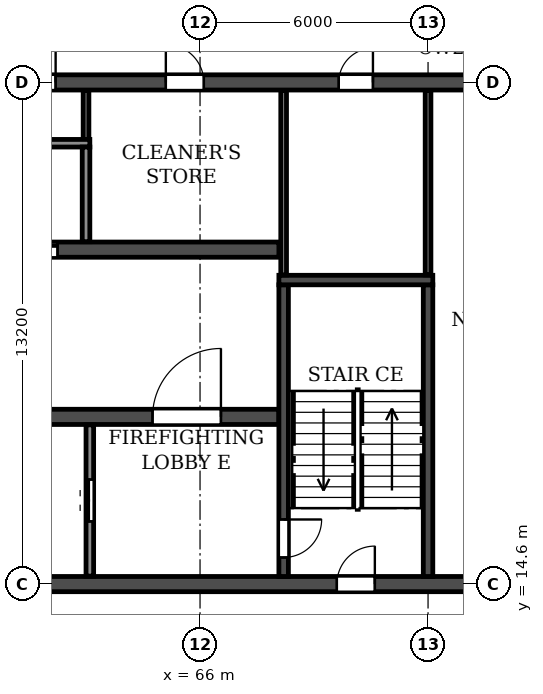
"""IFC4 building model, lengths in metres.
Left out: names, types, materials, properties, quantities, classifications, styles, units other than length and angle.
Written with IfcOpenShell. Run it as: python <this file> out.ifc"""

import sys

from ifc_helpers import new_model, si_unit, direction, frame, frame_2d, origin, place, context, subcontext, project, spatial, rectangle, extrude, element, fill, save


model = new_model("IFC4")
c1 = context("Model", 3, precision=1e-05, world=origin(), true_north=direction((0.0, 1.0)))
c2 = subcontext(c1, "Body", "Model", "MODEL_VIEW")
j1 = project(units=[si_unit("LENGTHUNIT", "METRE"), si_unit("PLANEANGLEUNIT", "RADIAN")], contexts=[c1])
p1 = place(None, origin())
s1 = spatial("IfcSite", under=j1, at=p1, CompositionType="ELEMENT")
p2 = place(p1, origin())
s2 = spatial("IfcBuilding", under=s1, at=p2, CompositionType="ELEMENT")
p3 = place(p2, frame((0.0, 0.0, 201.6)))
s3 = spatial("IfcBuildingStorey", under=s2, at=p3, CompositionType="ELEMENT", Elevation=201.6)
p4 = place(p3, frame((18.2, 14.6, 0.0), z_axis=(0.0, 0.0, 1.0), x_axis=(1.0, 0.0, 0.0)))
e1 = element("IfcWall", 1, at=p4, inside=s3, PredefinedType="SOLIDWALL", context=c2, shape_type="SweptSolid", body=[
    extrude(rectangle(XDim=65.6, YDim=0.4, at=frame_2d((32.8, 0.0))), origin(), (0.0, 0.0, 1.0), 3.08),
])
p5 = place(p4, frame((0.7, 0.0, 0.0)))
e2 = element("IfcOpeningElement", 2, at=p5, cuts=e1, PredefinedType="OPENING", context=c2, shape_type="SweptSolid", body=[
    extrude(rectangle(XDim=1.0, YDim=2.1, at=frame_2d((0.5, 1.05))), frame((0.0, 0.21, 0.0), z_axis=(0.0, -1.0, 0.0), x_axis=(1.0, 0.0, 0.0)), (0.0, 0.0, 1.0), 0.42),
])
p6 = place(p4, frame((8.6, 0.0, 0.0)))
e3 = element("IfcOpeningElement", 3, at=p6, cuts=e1, PredefinedType="OPENING", context=c2, shape_type="SweptSolid", body=[
    extrude(rectangle(XDim=1.0, YDim=2.1, at=frame_2d((0.5, 1.05))), frame((0.0, 0.21, 0.0), z_axis=(0.0, -1.0, 0.0), x_axis=(1.0, 0.0, 0.0)), (0.0, 0.0, 1.0), 0.42),
])
p7 = place(p4, frame((13.2, 0.0, 0.0)))
e4 = element("IfcOpeningElement", 4, at=p7, cuts=e1, PredefinedType="OPENING", context=c2, shape_type="SweptSolid", body=[
    extrude(rectangle(XDim=1.0, YDim=2.1, at=frame_2d((0.5, 1.05))), frame((0.0, 0.21, 0.0), z_axis=(0.0, -1.0, 0.0), x_axis=(1.0, 0.0, 0.0)), (0.0, 0.0, 1.0), 0.42),
])
p8 = place(p4, frame((27.1, 0.0, 0.0)))
e5 = element("IfcOpeningElement", 5, at=p8, cuts=e1, PredefinedType="OPENING", context=c2, shape_type="SweptSolid", body=[
    extrude(rectangle(XDim=1.0, YDim=2.1, at=frame_2d((0.5, 1.05))), frame((0.0, 0.21, 0.0), z_axis=(0.0, -1.0, 0.0), x_axis=(1.0, 0.0, 0.0)), (0.0, 0.0, 1.0), 0.42),
])
p9 = place(p4, frame((32.3, 0.0, 0.0)))
e6 = element("IfcOpeningElement", 6, at=p9, cuts=e1, PredefinedType="OPENING", context=c2, shape_type="SweptSolid", body=[
    extrude(rectangle(XDim=1.0, YDim=2.1, at=frame_2d((0.5, 1.05))), frame((0.0, 0.21, 0.0), z_axis=(0.0, -1.0, 0.0), x_axis=(1.0, 0.0, 0.0)), (0.0, 0.0, 1.0), 0.42),
])
p10 = place(p4, frame((34.9, 0.0, 0.0)))
e7 = element("IfcOpeningElement", 7, at=p10, cuts=e1, PredefinedType="OPENING", context=c2, shape_type="SweptSolid", body=[
    extrude(rectangle(XDim=1.0, YDim=2.1, at=frame_2d((0.5, 1.05))), frame((0.0, 0.21, 0.0), z_axis=(0.0, -1.0, 0.0), x_axis=(1.0, 0.0, 0.0)), (0.0, 0.0, 1.0), 0.42),
])
p11 = place(p4, frame((38.8, 0.0, 0.0)))
e8 = element("IfcOpeningElement", 8, at=p11, cuts=e1, PredefinedType="OPENING", context=c2, shape_type="SweptSolid", body=[
    extrude(rectangle(XDim=1.0, YDim=2.1, at=frame_2d((0.5, 1.05))), frame((0.0, 0.21, 0.0), z_axis=(0.0, -1.0, 0.0), x_axis=(1.0, 0.0, 0.0)), (0.0, 0.0, 1.0), 0.42),
])
p12 = place(p4, frame((51.4, 0.0, 0.0)))
e9 = element("IfcOpeningElement", 9, at=p12, cuts=e1, PredefinedType="OPENING", context=c2, shape_type="SweptSolid", body=[
    extrude(rectangle(XDim=1.0, YDim=2.1, at=frame_2d((0.5, 1.05))), frame((0.0, 0.21, 0.0), z_axis=(0.0, -1.0, 0.0), x_axis=(1.0, 0.0, 0.0)), (0.0, 0.0, 1.0), 0.42),
])
p13 = place(p4, frame((56.0, 0.0, 0.0)))
e10 = element("IfcOpeningElement", 10, at=p13, cuts=e1, PredefinedType="OPENING", context=c2, shape_type="SweptSolid", body=[
    extrude(rectangle(XDim=1.0, YDim=2.1, at=frame_2d((0.5, 1.05))), frame((0.0, 0.21, 0.0), z_axis=(0.0, -1.0, 0.0), x_axis=(1.0, 0.0, 0.0)), (0.0, 0.0, 1.0), 0.42),
])
p14 = place(p4, frame((63.9, 0.0, 0.0)))
e11 = element("IfcOpeningElement", 11, at=p14, cuts=e1, PredefinedType="OPENING", context=c2, shape_type="SweptSolid", body=[
    extrude(rectangle(XDim=1.0, YDim=2.1, at=frame_2d((0.5, 1.05))), frame((0.0, 0.21, 0.0), z_axis=(0.0, -1.0, 0.0), x_axis=(1.0, 0.0, 0.0)), (0.0, 0.0, 1.0), 0.42),
])
p15 = place(p3, frame((18.2, 27.8, 0.0), z_axis=(0.0, 0.0, 1.0), x_axis=(1.0, 0.0, 0.0)))
e12 = element("IfcWall", 12, at=p15, inside=s3, PredefinedType="SOLIDWALL", context=c2, shape_type="SweptSolid", body=[
    extrude(rectangle(XDim=65.6, YDim=0.4, at=frame_2d((32.8, 0.0))), origin(), (0.0, 0.0, 1.0), 3.08),
])
p16 = place(p15, frame((0.7, 0.0, 0.0)))
e13 = element("IfcOpeningElement", 13, at=p16, cuts=e12, PredefinedType="OPENING", context=c2, shape_type="SweptSolid", body=[
    extrude(rectangle(XDim=1.0, YDim=2.1, at=frame_2d((0.5, 1.05))), frame((0.0, 0.21, 0.0), z_axis=(0.0, -1.0, 0.0), x_axis=(1.0, 0.0, 0.0)), (0.0, 0.0, 1.0), 0.42),
])
p17 = place(p15, frame((4.05, 0.0, 0.0)))
e14 = element("IfcOpeningElement", 14, at=p17, cuts=e12, PredefinedType="OPENING", context=c2, shape_type="SweptSolid", body=[
    extrude(rectangle(XDim=0.9, YDim=2.1, at=frame_2d((0.45, 1.05))), frame((0.0, 0.21, 0.0), z_axis=(0.0, -1.0, 0.0), x_axis=(1.0, 0.0, 0.0)), (0.0, 0.0, 1.0), 0.42),
])
p18 = place(p15, frame((13.25, 0.0, 0.0)))
e15 = element("IfcOpeningElement", 15, at=p18, cuts=e12, PredefinedType="OPENING", context=c2, shape_type="SweptSolid", body=[
    extrude(rectangle(XDim=0.9, YDim=2.1, at=frame_2d((0.45, 1.05))), frame((0.0, 0.21, 0.0), z_axis=(0.0, -1.0, 0.0), x_axis=(1.0, 0.0, 0.0)), (0.0, 0.0, 1.0), 0.42),
])
p19 = place(p15, frame((17.7, 0.0, 0.0)))
e16 = element("IfcOpeningElement", 16, at=p19, cuts=e12, PredefinedType="OPENING", context=c2, shape_type="SweptSolid", body=[
    extrude(rectangle(XDim=1.0, YDim=2.1, at=frame_2d((0.5, 1.05))), frame((0.0, 0.21, 0.0), z_axis=(0.0, -1.0, 0.0), x_axis=(1.0, 0.0, 0.0)), (0.0, 0.0, 1.0), 0.42),
])
p20 = place(p15, frame((22.9, 0.0, 0.0)))
e17 = element("IfcOpeningElement", 17, at=p20, cuts=e12, PredefinedType="OPENING", context=c2, shape_type="SweptSolid", body=[
    extrude(rectangle(XDim=1.0, YDim=2.1, at=frame_2d((0.5, 1.05))), frame((0.0, 0.21, 0.0), z_axis=(0.0, -1.0, 0.0), x_axis=(1.0, 0.0, 0.0)), (0.0, 0.0, 1.0), 0.42),
])
p21 = place(p15, frame((29.4, 0.0, 0.0)))
e18 = element("IfcOpeningElement", 18, at=p21, cuts=e12, PredefinedType="OPENING", context=c2, shape_type="SweptSolid", body=[
    extrude(rectangle(XDim=1.0, YDim=2.1, at=frame_2d((0.5, 1.05))), frame((0.0, 0.21, 0.0), z_axis=(0.0, -1.0, 0.0), x_axis=(1.0, 0.0, 0.0)), (0.0, 0.0, 1.0), 0.42),
])
p22 = place(p15, frame((32.3, 0.0, 0.0)))
e19 = element("IfcOpeningElement", 19, at=p22, cuts=e12, PredefinedType="OPENING", context=c2, shape_type="SweptSolid", body=[
    extrude(rectangle(XDim=1.0, YDim=2.1, at=frame_2d((0.5, 1.05))), frame((0.0, 0.21, 0.0), z_axis=(0.0, -1.0, 0.0), x_axis=(1.0, 0.0, 0.0)), (0.0, 0.0, 1.0), 0.42),
])
p23 = place(p15, frame((35.2, 0.0, 0.0)))
e20 = element("IfcOpeningElement", 20, at=p23, cuts=e12, PredefinedType="OPENING", context=c2, shape_type="SweptSolid", body=[
    extrude(rectangle(XDim=1.0, YDim=2.1, at=frame_2d((0.5, 1.05))), frame((0.0, 0.21, 0.0), z_axis=(0.0, -1.0, 0.0), x_axis=(1.0, 0.0, 0.0)), (0.0, 0.0, 1.0), 0.42),
])
p24 = place(p15, frame((37.8, 0.0, 0.0)))
e21 = element("IfcOpeningElement", 21, at=p24, cuts=e12, PredefinedType="OPENING", context=c2, shape_type="SweptSolid", body=[
    extrude(rectangle(XDim=1.0, YDim=2.1, at=frame_2d((0.5, 1.05))), frame((0.0, 0.21, 0.0), z_axis=(0.0, -1.0, 0.0), x_axis=(1.0, 0.0, 0.0)), (0.0, 0.0, 1.0), 0.42),
])
p25 = place(p15, frame((40.4, 0.0, 0.0)))
e22 = element("IfcOpeningElement", 22, at=p25, cuts=e12, PredefinedType="OPENING", context=c2, shape_type="SweptSolid", body=[
    extrude(rectangle(XDim=1.0, YDim=2.1, at=frame_2d((0.5, 1.05))), frame((0.0, 0.21, 0.0), z_axis=(0.0, -1.0, 0.0), x_axis=(1.0, 0.0, 0.0)), (0.0, 0.0, 1.0), 0.42),
])
p26 = place(p15, frame((43.0, 0.0, 0.0)))
e23 = element("IfcOpeningElement", 23, at=p26, cuts=e12, PredefinedType="OPENING", context=c2, shape_type="SweptSolid", body=[
    extrude(rectangle(XDim=1.0, YDim=2.1, at=frame_2d((0.5, 1.05))), frame((0.0, 0.21, 0.0), z_axis=(0.0, -1.0, 0.0), x_axis=(1.0, 0.0, 0.0)), (0.0, 0.0, 1.0), 0.42),
])
p27 = place(p15, frame((46.9, 0.0, 0.0)))
e24 = element("IfcOpeningElement", 24, at=p27, cuts=e12, PredefinedType="OPENING", context=c2, shape_type="SweptSolid", body=[
    extrude(rectangle(XDim=1.0, YDim=2.1, at=frame_2d((0.5, 1.05))), frame((0.0, 0.21, 0.0), z_axis=(0.0, -1.0, 0.0), x_axis=(1.0, 0.0, 0.0)), (0.0, 0.0, 1.0), 0.42),
])
p28 = place(p15, frame((51.45, 0.0, 0.0)))
e25 = element("IfcOpeningElement", 25, at=p28, cuts=e12, PredefinedType="OPENING", context=c2, shape_type="SweptSolid", body=[
    extrude(rectangle(XDim=0.9, YDim=2.1, at=frame_2d((0.45, 1.05))), frame((0.0, 0.21, 0.0), z_axis=(0.0, -1.0, 0.0), x_axis=(1.0, 0.0, 0.0)), (0.0, 0.0, 1.0), 0.42),
])
p29 = place(p15, frame((60.65, 0.0, 0.0)))
e26 = element("IfcOpeningElement", 26, at=p29, cuts=e12, PredefinedType="OPENING", context=c2, shape_type="SweptSolid", body=[
    extrude(rectangle(XDim=0.9, YDim=2.1, at=frame_2d((0.45, 1.05))), frame((0.0, 0.21, 0.0), z_axis=(0.0, -1.0, 0.0), x_axis=(1.0, 0.0, 0.0)), (0.0, 0.0, 1.0), 0.42),
])
p30 = place(p15, frame((63.9, 0.0, 0.0)))
e27 = element("IfcOpeningElement", 27, at=p30, cuts=e12, PredefinedType="OPENING", context=c2, shape_type="SweptSolid", body=[
    extrude(rectangle(XDim=1.0, YDim=2.1, at=frame_2d((0.5, 1.05))), frame((0.0, 0.21, 0.0), z_axis=(0.0, -1.0, 0.0), x_axis=(1.0, 0.0, 0.0)), (0.0, 0.0, 1.0), 0.42),
])
p31 = place(p3, frame((33.925, 19.0, 0.0), z_axis=(0.0, 0.0, 1.0), x_axis=(1.0, 0.0, 0.0)))
e28 = element("IfcWall", 28, at=p31, inside=s3, PredefinedType="SOLIDWALL", context=c2, shape_type="SweptSolid", body=[
    extrude(rectangle(XDim=34.15, YDim=0.4, at=frame_2d((17.075, 0.0))), origin(), (0.0, 0.0, 1.0), 3.08),
])
p32 = place(p31, frame((16.175, 0.0, 0.0)))
e29 = element("IfcOpeningElement", 29, at=p32, cuts=e28, PredefinedType="OPENING", context=c2, shape_type="SweptSolid", body=[
    extrude(rectangle(XDim=1.8, YDim=2.1, at=frame_2d((0.9, 1.05))), frame((0.0, 0.21, 0.0), z_axis=(0.0, -1.0, 0.0), x_axis=(1.0, 0.0, 0.0)), (0.0, 0.0, 1.0), 0.42),
])
p33 = place(p31, frame((1.525, 0.0, 0.0)))
e30 = element("IfcOpeningElement", 30, at=p33, cuts=e28, PredefinedType="OPENING", context=c2, shape_type="SweptSolid", body=[
    extrude(rectangle(XDim=1.8, YDim=2.1, at=frame_2d((0.9, 1.05))), frame((0.0, 0.21, 0.0), z_axis=(0.0, -1.0, 0.0), x_axis=(1.0, 0.0, 0.0)), (0.0, 0.0, 1.0), 0.42),
])
p34 = place(p31, frame((30.825, 0.0, 0.0)))
e31 = element("IfcOpeningElement", 31, at=p34, cuts=e28, PredefinedType="OPENING", context=c2, shape_type="SweptSolid", body=[
    extrude(rectangle(XDim=1.8, YDim=2.1, at=frame_2d((0.9, 1.05))), frame((0.0, 0.21, 0.0), z_axis=(0.0, -1.0, 0.0), x_axis=(1.0, 0.0, 0.0)), (0.0, 0.0, 1.0), 0.42),
])
p35 = place(p3, frame((33.925, 23.4, 0.0), z_axis=(0.0, 0.0, 1.0), x_axis=(1.0, 0.0, 0.0)))
e32 = element("IfcWall", 32, at=p35, inside=s3, PredefinedType="SOLIDWALL", context=c2, shape_type="SweptSolid", body=[
    extrude(rectangle(XDim=34.15, YDim=0.4, at=frame_2d((17.075, 0.0))), origin(), (0.0, 0.0, 1.0), 3.08),
])
p36 = place(p35, frame((16.175, 0.0, 0.0)))
e33 = element("IfcOpeningElement", 33, at=p36, cuts=e32, PredefinedType="OPENING", context=c2, shape_type="SweptSolid", body=[
    extrude(rectangle(XDim=1.8, YDim=2.1, at=frame_2d((0.9, 1.05))), frame((0.0, 0.21, 0.0), z_axis=(0.0, -1.0, 0.0), x_axis=(1.0, 0.0, 0.0)), (0.0, 0.0, 1.0), 0.42),
])
p37 = place(p35, frame((0.625, 0.0, 0.0)))
e34 = element("IfcOpeningElement", 34, at=p37, cuts=e32, PredefinedType="OPENING", context=c2, shape_type="SweptSolid", body=[
    extrude(rectangle(XDim=1.1, YDim=2.1, at=frame_2d((0.55, 1.05))), frame((0.0, 0.21, 0.0), z_axis=(0.0, -1.0, 0.0), x_axis=(1.0, 0.0, 0.0)), (0.0, 0.0, 1.0), 0.42),
])
p38 = place(p35, frame((3.225, 0.0, 0.0)))
e35 = element("IfcOpeningElement", 35, at=p38, cuts=e32, PredefinedType="OPENING", context=c2, shape_type="SweptSolid", body=[
    extrude(rectangle(XDim=1.1, YDim=2.1, at=frame_2d((0.55, 1.05))), frame((0.0, 0.21, 0.0), z_axis=(0.0, -1.0, 0.0), x_axis=(1.0, 0.0, 0.0)), (0.0, 0.0, 1.0), 0.42),
])
p39 = place(p35, frame((5.825, 0.0, 0.0)))
e36 = element("IfcOpeningElement", 36, at=p39, cuts=e32, PredefinedType="OPENING", context=c2, shape_type="SweptSolid", body=[
    extrude(rectangle(XDim=1.1, YDim=2.1, at=frame_2d((0.55, 1.05))), frame((0.0, 0.21, 0.0), z_axis=(0.0, -1.0, 0.0), x_axis=(1.0, 0.0, 0.0)), (0.0, 0.0, 1.0), 0.42),
])
p40 = place(p35, frame((8.425, 0.0, 0.0)))
e37 = element("IfcOpeningElement", 37, at=p40, cuts=e32, PredefinedType="OPENING", context=c2, shape_type="SweptSolid", body=[
    extrude(rectangle(XDim=1.1, YDim=2.1, at=frame_2d((0.55, 1.05))), frame((0.0, 0.21, 0.0), z_axis=(0.0, -1.0, 0.0), x_axis=(1.0, 0.0, 0.0)), (0.0, 0.0, 1.0), 0.42),
])
p41 = place(p35, frame((11.025, 0.0, 0.0)))
e38 = element("IfcOpeningElement", 38, at=p41, cuts=e32, PredefinedType="OPENING", context=c2, shape_type="SweptSolid", body=[
    extrude(rectangle(XDim=1.1, YDim=2.1, at=frame_2d((0.55, 1.05))), frame((0.0, 0.21, 0.0), z_axis=(0.0, -1.0, 0.0), x_axis=(1.0, 0.0, 0.0)), (0.0, 0.0, 1.0), 0.42),
])
p42 = place(p35, frame((13.625, 0.0, 0.0)))
e39 = element("IfcOpeningElement", 39, at=p42, cuts=e32, PredefinedType="OPENING", context=c2, shape_type="SweptSolid", body=[
    extrude(rectangle(XDim=1.1, YDim=2.1, at=frame_2d((0.55, 1.05))), frame((0.0, 0.21, 0.0), z_axis=(0.0, -1.0, 0.0), x_axis=(1.0, 0.0, 0.0)), (0.0, 0.0, 1.0), 0.42),
])
p43 = place(p35, frame((27.225, 0.0, 0.0)))
e40 = element("IfcOpeningElement", 40, at=p43, cuts=e32, PredefinedType="OPENING", context=c2, shape_type="SweptSolid", body=[
    extrude(rectangle(XDim=1.1, YDim=2.1, at=frame_2d((0.55, 1.05))), frame((0.0, 0.21, 0.0), z_axis=(0.0, -1.0, 0.0), x_axis=(1.0, 0.0, 0.0)), (0.0, 0.0, 1.0), 0.42),
])
p44 = place(p3, frame((68.2, 14.8, 0.0), z_axis=(0.0, 0.0, 1.0), x_axis=(0.0, 1.0, 0.0)))
e41 = element("IfcWall", 41, at=p44, inside=s3, PredefinedType="SOLIDWALL", context=c2, shape_type="SweptSolid", body=[
    extrude(rectangle(XDim=7.675, YDim=0.25, at=frame_2d((3.837, 0.0))), origin(), (0.0, 0.0, 1.0), 3.08),
])
p45 = place(p44, frame((0.5, 0.0, 0.0)))
e42 = element("IfcOpeningElement", 42, at=p45, cuts=e41, PredefinedType="OPENING", context=c2, shape_type="SweptSolid", body=[
    extrude(rectangle(XDim=1.0, YDim=2.1, at=frame_2d((0.5, 1.05))), frame((0.0, 0.135, 0.0), z_axis=(0.0, -1.0, 0.0), x_axis=(1.0, 0.0, 0.0)), (0.0, 0.0, 1.0), 0.27),
])
p46 = place(p3, frame((72.0, 14.8, 0.0), z_axis=(0.0, 0.0, 1.0), x_axis=(0.0, 1.0, 0.0)))
e43 = element("IfcWall", 43, at=p46, inside=s3, PredefinedType="SOLIDWALL", context=c2, shape_type="SweptSolid", body=[
    extrude(rectangle(XDim=7.675, YDim=0.25, at=frame_2d((3.837, 0.0))), origin(), (0.0, 0.0, 1.0), 3.08),
])
p47 = place(p3, frame((68.075, 22.6, 0.0), z_axis=(0.0, 0.0, 1.0), x_axis=(1.0, 0.0, 0.0)))
e44 = element("IfcWall", 44, at=p47, inside=s3, PredefinedType="SOLIDWALL", context=c2, shape_type="SweptSolid", body=[
    extrude(rectangle(XDim=4.05, YDim=0.25, at=frame_2d((2.025, 0.0))), origin(), (0.0, 0.0, 1.0), 3.08),
])
p48 = place(p3, frame((63.0, 26.3, 0.0), z_axis=(0.0, 0.0, 1.0), x_axis=(0.0, 1.0, 0.0)))
e45 = element("IfcWall", 45, at=p48, inside=s3, PredefinedType="PARTITIONING", context=c2, shape_type="SweptSolid", body=[
    extrude(rectangle(XDim=1.29, YDim=0.15, at=frame_2d((0.645, 0.0))), origin(), (0.0, 0.0, 1.0), 3.08),
])
for number, where, z_axis, x_axis in (
    (46, (68.2, 22.735, 0.0), (0.0, 0.0, 1.0), (0.0, 1.0, 0.0)),
    (47, (72.0, 22.735, 0.0), (0.0, 0.0, 1.0), (0.0, 1.0, 0.0)),
):
    element("IfcWall", number, at=place(p3, frame(where, z_axis=z_axis, x_axis=x_axis)), inside=s3, PredefinedType="PARTITIONING", context=c2, shape_type="SweptSolid", body=[
        extrude(rectangle(XDim=4.855, YDim=0.15, at=frame_2d((2.427, 0.0))), origin(), (0.0, 0.0, 1.0), 3.08),
    ])
p49 = place(p3, frame((57.7, 26.2, 0.0), z_axis=(0.0, 0.0, 1.0), x_axis=(1.0, 0.0, 0.0)))
e48 = element("IfcWall", 48, at=p49, inside=s3, PredefinedType="PARTITIONING", context=c2, shape_type="SweptSolid", body=[
    extrude(rectangle(XDim=5.4, YDim=0.2, at=frame_2d((2.7, 0.0))), origin(), (0.0, 0.0, 1.0), 3.08),
])
p50 = place(p3, frame((63.0, 23.61, 0.0), z_axis=(0.0, 0.0, 1.0), x_axis=(0.0, 1.0, 0.0)))
e49 = element("IfcWall", 49, at=p50, inside=s3, PredefinedType="PARTITIONING", context=c2, shape_type="SweptSolid", body=[
    extrude(rectangle(XDim=2.49, YDim=0.2, at=frame_2d((1.245, 0.0))), origin(), (0.0, 0.0, 1.0), 3.08),
])
p51 = place(p3, frame((63.1, 14.81, 0.0), z_axis=(0.0, 0.0, 1.0), x_axis=(0.0, 1.0, 0.0)))
e50 = element("IfcWall", 50, at=p51, inside=s3, PredefinedType="PARTITIONING", context=c2, shape_type="SweptSolid", body=[
    extrude(rectangle(XDim=3.98, YDim=0.2, at=frame_2d((1.99, 0.0))), origin(), (0.0, 0.0, 1.0), 3.08),
])
p52 = place(p51, frame((1.44, 0.0, 0.0)))
e51 = element("IfcOpeningElement", 51, at=p52, cuts=e50, PredefinedType="OPENING", context=c2, shape_type="SweptSolid", body=[
    extrude(rectangle(XDim=1.1, YDim=2.1, at=frame_2d((0.55, 1.05))), frame((0.0, 0.11, 0.0), z_axis=(0.0, -1.0, 0.0), x_axis=(1.0, 0.0, 0.0)), (0.0, 0.0, 1.0), 0.22),
])
p53 = place(p26, origin())
e52 = element("IfcDoor", 52, at=p53, inside=s3, OperationType="SINGLE_SWING_RIGHT", PredefinedType="DOOR", context=c2, shape_type="SweptSolid", body=[
    extrude(rectangle(XDim=1.0, YDim=2.1, at=frame_2d((0.5, 1.05))), frame((0.0, 0.025, 0.0), z_axis=(0.0, -1.0, 0.0), x_axis=(1.0, 0.0, 0.0)), (0.0, 0.0, 1.0), 0.05),
])
fill(e23, e52)
p54 = place(p27, origin())
e53 = element("IfcDoor", 53, at=p54, inside=s3, OperationType="SINGLE_SWING_LEFT", PredefinedType="DOOR", context=c2, shape_type="SweptSolid", body=[
    extrude(rectangle(XDim=1.0, YDim=2.1, at=frame_2d((0.5, 1.05))), frame((0.0, 0.025, 0.0), z_axis=(0.0, -1.0, 0.0), x_axis=(1.0, 0.0, 0.0)), (0.0, 0.0, 1.0), 0.05),
])
fill(e24, e53)
p55 = place(p28, origin())
e54 = element("IfcDoor", 54, at=p55, inside=s3, OperationType="SINGLE_SWING_RIGHT", PredefinedType="DOOR", context=c2, shape_type="SweptSolid", body=[
    extrude(rectangle(XDim=0.9, YDim=2.1, at=frame_2d((0.45, 1.05))), frame((0.0, 0.025, 0.0), z_axis=(0.0, -1.0, 0.0), x_axis=(1.0, 0.0, 0.0)), (0.0, 0.0, 1.0), 0.05),
])
fill(e25, e54)
p56 = place(p12, origin())
e55 = element("IfcDoor", 55, at=p56, inside=s3, OperationType="SINGLE_SWING_RIGHT", PredefinedType="DOOR", context=c2, shape_type="SweptSolid", body=[
    extrude(rectangle(XDim=1.0, YDim=2.1, at=frame_2d((0.5, 1.05))), frame((0.0, 0.025, 0.0), z_axis=(0.0, -1.0, 0.0), x_axis=(1.0, 0.0, 0.0)), (0.0, 0.0, 1.0), 0.05),
])
fill(e9, e55)
p57 = place(p52, origin())
e56 = element("IfcDoor", 56, at=p57, inside=s3, OperationType="DOUBLE_DOOR_SLIDING", PredefinedType="DOOR", context=c2, shape_type="SweptSolid", body=[
    extrude(rectangle(XDim=1.1, YDim=2.1, at=frame_2d((0.55, 1.05))), frame((0.0, 0.025, 0.0), z_axis=(0.0, -1.0, 0.0), x_axis=(1.0, 0.0, 0.0)), (0.0, 0.0, 1.0), 0.05),
])
fill(e51, e56)
p58 = place(p45, frame((1.0, 0.0, 0.0), z_axis=(0.0, 0.0, 1.0), x_axis=(-1.0, 0.0, 0.0)))
e57 = element("IfcDoor", 57, at=p58, inside=s3, OperationType="SINGLE_SWING_LEFT", PredefinedType="DOOR", context=c2, shape_type="SweptSolid", body=[
    extrude(rectangle(XDim=1.0, YDim=2.1, at=frame_2d((0.5, 1.05))), frame((0.0, 0.025, 0.0), z_axis=(0.0, -1.0, 0.0), x_axis=(1.0, 0.0, 0.0)), (0.0, 0.0, 1.0), 0.05),
])
fill(e42, e57)
p59 = place(p43, origin())
e58 = element("IfcDoor", 58, at=p59, inside=s3, OperationType="DOUBLE_DOOR_SLIDING", PredefinedType="DOOR", context=c2, shape_type="SweptSolid", body=[
    extrude(rectangle(XDim=1.1, YDim=2.1, at=frame_2d((0.55, 1.05))), frame((0.0, 0.025, 0.0), z_axis=(0.0, -1.0, 0.0), x_axis=(1.0, 0.0, 0.0)), (0.0, 0.0, 1.0), 0.05),
])
fill(e40, e58)
p60 = place(p34, origin())
e59 = element("IfcDoor", 59, at=p60, inside=s3, OperationType="DOUBLE_DOOR_SINGLE_SWING", PredefinedType="DOOR", context=c2, shape_type="SweptSolid", body=[
    extrude(rectangle(XDim=1.8, YDim=2.1, at=frame_2d((0.9, 1.05))), frame((0.0, 0.025, 0.0), z_axis=(0.0, -1.0, 0.0), x_axis=(1.0, 0.0, 0.0)), (0.0, 0.0, 1.0), 0.05),
])
fill(e31, e59)
save(model, sys.argv[1])
